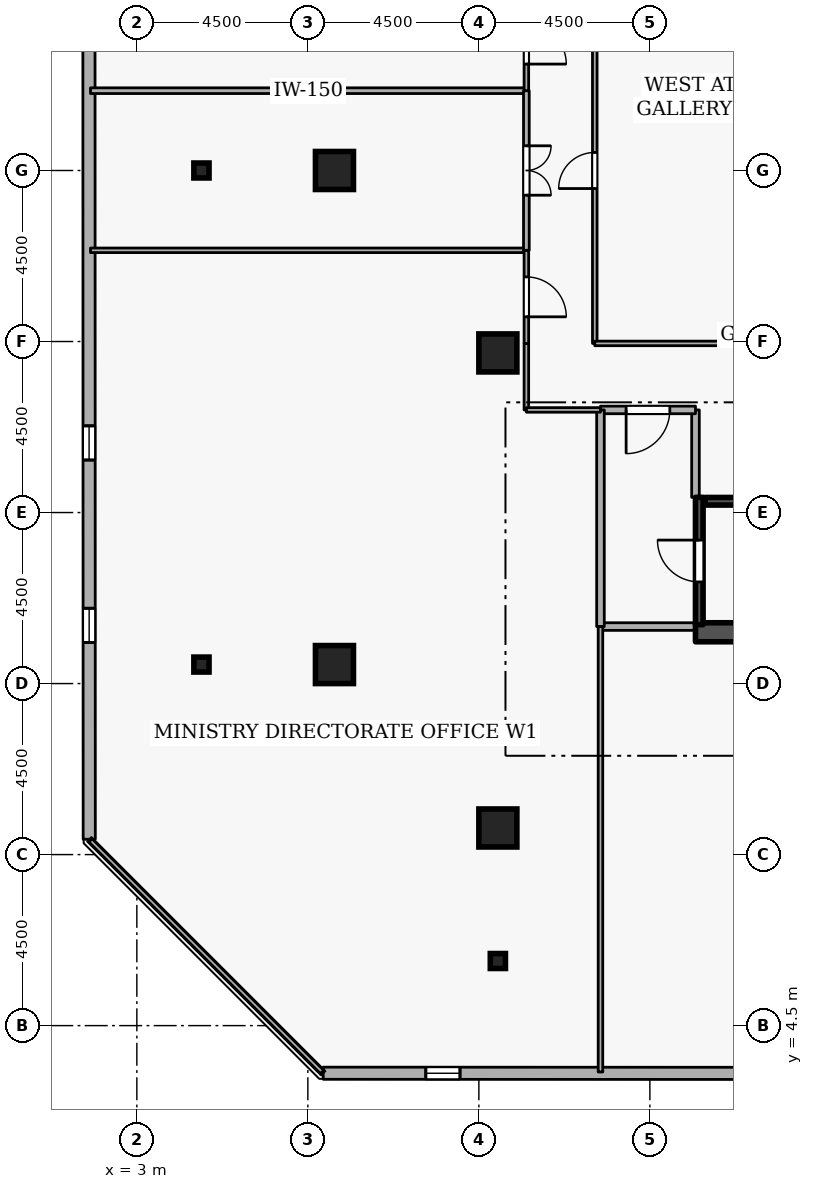
"""IFC4 building model, lengths in metres.
Left out: names, types, materials, properties, quantities, classifications, styles, units other than length and angle.
Written with IfcOpenShell. Run it as: python <this file> out.ifc"""

import sys

from ifc_helpers import new_model, si_unit, direction, frame, frame_2d, origin, origin_2d, place, context, subcontext, project, spatial, rectangle, i_section, extrude, element, fill, save


model = new_model("IFC4")
c1 = context("Model", 3, precision=1e-05, world=origin(), true_north=direction((0.0, 1.0)))
c2 = subcontext(c1, "Body", "Model", "MODEL_VIEW")
j1 = project(units=[si_unit("LENGTHUNIT", "METRE"), si_unit("PLANEANGLEUNIT", "RADIAN")], contexts=[c1])
p1 = place(None, origin())
s1 = spatial("IfcSite", under=j1, at=p1, CompositionType="ELEMENT")
p2 = place(p1, origin())
s2 = spatial("IfcBuilding", under=s1, at=p2, CompositionType="ELEMENT")
p3 = place(p2, frame((0.0, 0.0, 229.5)))
s3 = spatial("IfcBuildingStorey", under=s2, at=p3, CompositionType="ELEMENT", Elevation=229.5)
p4 = place(p3, frame((17.7, 14.85, 0.0), z_axis=(0.0, 0.0, 1.0), x_axis=(1.0, 0.0, 0.0)))
e1 = element("IfcWall", 1, at=p4, inside=s3, PredefinedType="SHEAR", context=c2, shape_type="SweptSolid", body=[
    extrude(rectangle(XDim=15.6, YDim=0.5, at=frame_2d((7.8, 0.0))), origin(), (0.0, 0.0, 1.0), 3.6),
])
for number, where, z_axis, x_axis in (
    (2, (12.5, 9.7, 0.0), (0.0, 0.0, 1.0), (1.0, 0.0, 0.0)),
    (3, (8.2, 14.0, 0.0), (0.0, 0.0, 1.0), (1.0, 0.0, 0.0)),
    (4, (8.2, 27.0, 0.0), (0.0, 0.0, 1.0), (1.0, 0.0, 0.0)),
    (5, (12.5, 22.2, 0.0), (0.0, 0.0, 1.0), (1.0, 0.0, 0.0)),
):
    element("IfcColumn", number, at=place(p3, frame(where, z_axis=z_axis, x_axis=x_axis)), inside=s3, PredefinedType="COLUMN", context=c2, shape_type="SweptSolid", body=[
        extrude(rectangle(XDim=1.0, YDim=1.0, at=origin_2d()), origin(), (0.0, 0.0, 1.0), 3.6),
    ])
for number, where, z_axis, x_axis in (
    (6, (12.5, 6.2, 0.0), (0.0, 0.0, 1.0), (1.0, 0.0, 0.0)),
    (7, (4.7, 14.0, 0.0), (0.0, 0.0, 1.0), (1.0, 0.0, 0.0)),
    (8, (4.7, 27.0, 0.0), (0.0, 0.0, 1.0), (1.0, 0.0, 0.0)),
):
    element("IfcColumn", number, at=place(p3, frame(where, z_axis=z_axis, x_axis=x_axis)), inside=s3, PredefinedType="COLUMN", context=c2, shape_type="SweptSolid", body=[
        extrude(i_section(OverallWidth=0.399, OverallDepth=0.394, WebThickness=0.023, FlangeThickness=0.037, FilletRadius=0.015, at=origin_2d()), origin(), (0.0, 0.0, 1.0), 3.6),
    ])
p5 = place(p3, frame((7.904, 3.247, 0.0), z_axis=(0.0, 0.0, 1.0), x_axis=(0.999999933399, -0.000364968916, 0.0)))
e9 = element("IfcWall", 9, at=p5, inside=s3, PredefinedType="STANDARD", context=c2, shape_type="SweptSolid", body=[
    extrude(rectangle(XDim=32.778, YDim=0.32, at=frame_2d((16.389, 0.0))), origin(), (0.0, 0.0, 1.0), 2.7),
])
p6 = place(p5, frame((2.7, 0.0, 0.72)))
e10 = element("IfcOpeningElement", 10, at=p6, cuts=e9, PredefinedType="OPENING", context=c2, shape_type="SweptSolid", body=[
    extrude(rectangle(XDim=0.9, YDim=1.75, at=frame_2d((0.45, 0.875))), frame((0.0, 0.17, 0.0), z_axis=(0.0, -1.0, 0.0), x_axis=(1.0, 0.0, 0.0)), (0.0, 0.0, 1.0), 0.34),
])
p7 = place(p5, frame((12.3, 0.0, 0.72)))
e11 = element("IfcOpeningElement", 11, at=p7, cuts=e9, PredefinedType="OPENING", context=c2, shape_type="SweptSolid", body=[
    extrude(rectangle(XDim=0.9, YDim=1.75, at=frame_2d((0.45, 0.875))), frame((0.0, 0.17, 0.0), z_axis=(0.0, -1.0, 0.0), x_axis=(1.0, 0.0, 0.0)), (0.0, 0.0, 1.0), 0.34),
])
p8 = place(p5, frame((17.1, 0.0, 0.72)))
e12 = element("IfcOpeningElement", 12, at=p8, cuts=e9, PredefinedType="OPENING", context=c2, shape_type="SweptSolid", body=[
    extrude(rectangle(XDim=0.9, YDim=1.75, at=frame_2d((0.45, 0.875))), frame((0.0, 0.17, 0.0), z_axis=(0.0, -1.0, 0.0), x_axis=(1.0, 0.0, 0.0)), (0.0, 0.0, 1.0), 0.34),
])
p9 = place(p5, frame((21.9, 0.0, 0.72)))
e13 = element("IfcOpeningElement", 13, at=p9, cuts=e9, PredefinedType="OPENING", context=c2, shape_type="SweptSolid", body=[
    extrude(rectangle(XDim=0.9, YDim=1.75, at=frame_2d((0.45, 0.875))), frame((0.0, 0.17, 0.0), z_axis=(0.0, -1.0, 0.0), x_axis=(1.0, 0.0, 0.0)), (0.0, 0.0, 1.0), 0.34),
])
p10 = place(p5, frame((26.7, 0.0, 0.72)))
e14 = element("IfcOpeningElement", 14, at=p10, cuts=e9, PredefinedType="OPENING", context=c2, shape_type="SweptSolid", body=[
    extrude(rectangle(XDim=0.9, YDim=1.75, at=frame_2d((0.45, 0.875))), frame((0.0, 0.17, 0.0), z_axis=(0.0, -1.0, 0.0), x_axis=(1.0, 0.0, 0.0)), (0.0, 0.0, 1.0), 0.34),
])
p11 = place(p3, frame((1.735, 42.181, 0.0), z_axis=(0.0, 0.0, 1.0), x_axis=(0.000364968916, -0.999999933399, 0.0)))
e15 = element("IfcWall", 15, at=p11, inside=s3, PredefinedType="STANDARD", context=c2, shape_type="SweptSolid", body=[
    extrude(rectangle(XDim=32.778, YDim=0.32, at=frame_2d((16.389, 0.0))), origin(), (0.0, 0.0, 1.0), 2.7),
])
p12 = place(p11, frame((2.7, 0.0, 0.72)))
e16 = element("IfcOpeningElement", 16, at=p12, cuts=e15, PredefinedType="OPENING", context=c2, shape_type="SweptSolid", body=[
    extrude(rectangle(XDim=0.9, YDim=1.75, at=frame_2d((0.45, 0.875))), frame((0.0, 0.17, 0.0), z_axis=(0.0, -1.0, 0.0), x_axis=(1.0, 0.0, 0.0)), (0.0, 0.0, 1.0), 0.34),
])
p13 = place(p11, frame((7.5, 0.0, 0.72)))
e17 = element("IfcOpeningElement", 17, at=p13, cuts=e15, PredefinedType="OPENING", context=c2, shape_type="SweptSolid", body=[
    extrude(rectangle(XDim=0.9, YDim=1.75, at=frame_2d((0.45, 0.875))), frame((0.0, 0.17, 0.0), z_axis=(0.0, -1.0, 0.0), x_axis=(1.0, 0.0, 0.0)), (0.0, 0.0, 1.0), 0.34),
])
p14 = place(p11, frame((21.9, 0.0, 0.72)))
e18 = element("IfcOpeningElement", 18, at=p14, cuts=e15, PredefinedType="OPENING", context=c2, shape_type="SweptSolid", body=[
    extrude(rectangle(XDim=0.9, YDim=1.75, at=frame_2d((0.45, 0.875))), frame((0.0, 0.17, 0.0), z_axis=(0.0, -1.0, 0.0), x_axis=(1.0, 0.0, 0.0)), (0.0, 0.0, 1.0), 0.34),
])
p15 = place(p11, frame((26.7, 0.0, 0.72)))
e19 = element("IfcOpeningElement", 19, at=p15, cuts=e15, PredefinedType="OPENING", context=c2, shape_type="SweptSolid", body=[
    extrude(rectangle(XDim=0.9, YDim=1.75, at=frame_2d((0.45, 0.875))), frame((0.0, 0.17, 0.0), z_axis=(0.0, -1.0, 0.0), x_axis=(1.0, 0.0, 0.0)), (0.0, 0.0, 1.0), 0.34),
])
p16 = place(p3, frame((17.8, 15.05, 0.0), z_axis=(0.0, 0.0, 1.0), x_axis=(0.0, 1.0, 0.0)))
e20 = element("IfcWall", 20, at=p16, inside=s3, PredefinedType="SHEAR", context=c2, shape_type="SweptSolid", body=[
    extrude(rectangle(XDim=3.35, YDim=0.2, at=frame_2d((1.675, 0.0))), origin(), (0.0, 0.0, 1.0), 3.6),
])
p17 = place(p16, frame((1.125, 0.0, 0.0)))
e21 = element("IfcOpeningElement", 21, at=p17, cuts=e20, PredefinedType="OPENING", context=c2, shape_type="SweptSolid", body=[
    extrude(rectangle(XDim=1.1, YDim=2.1, at=frame_2d((0.55, 1.05))), frame((0.0, 0.11, 0.0), z_axis=(0.0, -1.0, 0.0), x_axis=(1.0, 0.0, 0.0)), (0.0, 0.0, 1.0), 0.22),
])
p18 = place(p3, frame((25.05, 18.297, 0.0), z_axis=(0.0, 0.0, 1.0), x_axis=(-1.0, 0.0, 0.0)))
e22 = element("IfcWall", 22, at=p18, inside=s3, PredefinedType="SHEAR", context=c2, shape_type="SweptSolid", body=[
    extrude(rectangle(XDim=7.1, YDim=0.2, at=frame_2d((3.55, 0.0))), origin(), (0.0, 0.0, 1.0), 3.6),
])
p19 = place(p3, frame((15.2, 15.0, 0.0), z_axis=(0.0, 0.0, 1.0), x_axis=(1.0, 0.0, 0.0)))
e23 = element("IfcWall", 23, at=p19, inside=s3, PredefinedType="STANDARD", context=c2, shape_type="SweptSolid", body=[
    extrude(rectangle(XDim=2.5, YDim=0.2, at=frame_2d((1.25, 0.0))), origin(), (0.0, 0.0, 1.0), 3.3),
])
p20 = place(p3, frame((17.7, 18.4, 0.0), z_axis=(0.0, 0.0, 1.0), x_axis=(0.0, 1.0, 0.0)))
e24 = element("IfcWall", 24, at=p20, inside=s3, PredefinedType="STANDARD", context=c2, shape_type="SweptSolid", body=[
    extrude(rectangle(XDim=2.3, YDim=0.2, at=frame_2d((1.15, 0.0))), origin(), (0.0, 0.0, 1.0), 2.505),
])
p21 = place(p3, frame((17.7, 20.7, 0.0), z_axis=(0.0, 0.0, 1.0), x_axis=(-1.0, 0.0, 0.0)))
e25 = element("IfcWall", 25, at=p21, inside=s3, PredefinedType="STANDARD", context=c2, shape_type="SweptSolid", body=[
    extrude(rectangle(XDim=2.5, YDim=0.2, at=frame_2d((1.25, 0.0))), origin(), (0.0, 0.0, 1.0), 3.3),
])
p22 = place(p21, frame((0.675, 0.0, 0.0)))
e26 = element("IfcOpeningElement", 26, at=p22, cuts=e25, PredefinedType="OPENING", context=c2, shape_type="SweptSolid", body=[
    extrude(rectangle(XDim=1.15, YDim=2.1, at=frame_2d((0.575, 1.05))), frame((0.0, 0.11, 0.0), z_axis=(0.0, -1.0, 0.0), x_axis=(1.0, 0.0, 0.0)), (0.0, 0.0, 1.0), 0.22),
])
p23 = place(p3, frame((15.2, 20.7, 0.0), z_axis=(0.0, 0.0, 1.0), x_axis=(0.0, -1.0, 0.0)))
e27 = element("IfcWall", 27, at=p23, inside=s3, PredefinedType="STANDARD", context=c2, shape_type="SweptSolid", body=[
    extrude(rectangle(XDim=5.7, YDim=0.2, at=frame_2d((2.85, 0.0))), origin(), (0.0, 0.0, 1.0), 3.3),
])
p24 = place(p3, frame((13.25, 22.45, 0.0), z_axis=(0.0, 0.0, 1.0), x_axis=(0.0, -1.0, 0.0)))
e28 = element("IfcWall", 28, at=p24, inside=s3, PredefinedType="PARTITIONING", context=c2, shape_type="SweptSolid", body=[
    extrude(rectangle(XDim=1.75, YDim=0.12, at=frame_2d((0.875, 0.0))), origin(), (0.0, 0.0, 1.0), 3.3),
])
p25 = place(p3, frame((13.25, 20.7, 0.0), z_axis=(0.0, 0.0, 1.0), x_axis=(1.0, 0.0, 0.0)))
e29 = element("IfcWall", 29, at=p25, inside=s3, PredefinedType="PARTITIONING", context=c2, shape_type="SweptSolid", body=[
    extrude(rectangle(XDim=1.95, YDim=0.12, at=frame_2d((0.975, 0.0))), origin(), (0.0, 0.0, 1.0), 3.3),
])
p26 = place(p3, frame((15.2, 15.0, 0.0), z_axis=(0.0, 0.0, 1.0), x_axis=(0.0, -1.0, 0.0)))
e30 = element("IfcWall", 30, at=p26, inside=s3, PredefinedType="PARTITIONING", context=c2, shape_type="SweptSolid", body=[
    extrude(rectangle(XDim=11.72, YDim=0.12, at=frame_2d((5.86, 0.0))), origin(), (0.0, 0.0, 1.0), 3.3),
])
p27 = place(p3, frame((7.875, 3.28, 0.0), z_axis=(0.0, 0.0, 1.0), x_axis=(-0.707106781187, 0.707106781187, 0.0)))
e31 = element("IfcWall", 31, at=p27, inside=s3, PredefinedType="PARTITIONING", context=c2, shape_type="SweptSolid", body=[
    extrude(rectangle(XDim=8.619, YDim=0.12, at=frame_2d((4.31, 0.0))), origin(), (0.0, 0.0, 1.0), 3.3),
])
p28 = place(p3, frame((1.78, 24.9, 0.0), z_axis=(0.0, 0.0, 1.0), x_axis=(1.0, 0.0, 0.0)))
e32 = element("IfcWall", 32, at=p28, inside=s3, PredefinedType="PARTITIONING", context=c2, shape_type="SweptSolid", body=[
    extrude(rectangle(XDim=11.47, YDim=0.12, at=frame_2d((5.735, 0.0))), origin(), (0.0, 0.0, 1.0), 3.3),
])
p29 = place(p3, frame((13.25, 24.9, 0.0), z_axis=(0.0, 0.0, 1.0), x_axis=(0.0, -1.0, 0.0)))
e33 = element("IfcWall", 33, at=p29, inside=s3, PredefinedType="PARTITIONING", context=c2, shape_type="SweptSolid", body=[
    extrude(rectangle(XDim=2.45, YDim=0.12, at=frame_2d((1.225, 0.0))), origin(), (0.0, 0.0, 1.0), 3.3),
])
p30 = place(p29, frame((0.7, 0.0, 0.0)))
e34 = element("IfcOpeningElement", 34, at=p30, cuts=e33, PredefinedType="OPENING", context=c2, shape_type="SweptSolid", body=[
    extrude(rectangle(XDim=1.05, YDim=2.1, at=frame_2d((0.525, 1.05))), frame((0.0, 0.07, 0.0), z_axis=(0.0, -1.0, 0.0), x_axis=(1.0, 0.0, 0.0)), (0.0, 0.0, 1.0), 0.14),
])
p31 = place(p3, frame((1.78, 29.1, 0.0), z_axis=(0.0, 0.0, 1.0), x_axis=(1.0, 0.0, 0.0)))
e35 = element("IfcWall", 35, at=p31, inside=s3, PredefinedType="PARTITIONING", context=c2, shape_type="SweptSolid", body=[
    extrude(rectangle(XDim=11.47, YDim=0.15, at=frame_2d((5.735, 0.0))), origin(), (0.0, 0.0, 1.0), 3.3),
])
p32 = place(p3, frame((13.25, 29.1, 0.0), z_axis=(0.0, 0.0, 1.0), x_axis=(0.0, -1.0, 0.0)))
e36 = element("IfcWall", 36, at=p32, inside=s3, PredefinedType="PARTITIONING", context=c2, shape_type="SweptSolid", body=[
    extrude(rectangle(XDim=4.2, YDim=0.15, at=frame_2d((2.1, 0.0))), origin(), (0.0, 0.0, 1.0), 3.3),
])
p33 = place(p32, frame((1.45, 0.0, 0.0)))
e37 = element("IfcOpeningElement", 37, at=p33, cuts=e36, PredefinedType="OPENING", context=c2, shape_type="SweptSolid", body=[
    extrude(rectangle(XDim=1.3, YDim=2.12, at=frame_2d((0.65, 1.06))), frame((0.0, 0.085, 0.0), z_axis=(0.0, -1.0, 0.0), x_axis=(1.0, 0.0, 0.0)), (0.0, 0.0, 1.0), 0.17),
])
p34 = place(p3, frame((13.25, 31.55, 0.0), z_axis=(0.0, 0.0, 1.0), x_axis=(0.0, -1.0, 0.0)))
e38 = element("IfcWall", 38, at=p34, inside=s3, PredefinedType="PARTITIONING", context=c2, shape_type="SweptSolid", body=[
    extrude(rectangle(XDim=2.45, YDim=0.12, at=frame_2d((1.225, 0.0))), origin(), (0.0, 0.0, 1.0), 3.3),
])
p35 = place(p34, frame((0.7, 0.0, 0.0)))
e39 = element("IfcOpeningElement", 39, at=p35, cuts=e38, PredefinedType="OPENING", context=c2, shape_type="SweptSolid", body=[
    extrude(rectangle(XDim=1.05, YDim=2.1, at=frame_2d((0.525, 1.05))), frame((0.0, 0.07, 0.0), z_axis=(0.0, -1.0, 0.0), x_axis=(1.0, 0.0, 0.0)), (0.0, 0.0, 1.0), 0.14),
])
p36 = place(p3, frame((15.05, 22.45, 0.0), z_axis=(0.0, 0.0, 1.0), x_axis=(0.0, 1.0, 0.0)))
e40 = element("IfcWall", 40, at=p36, inside=s3, PredefinedType="PARTITIONING", context=c2, shape_type="SweptSolid", body=[
    extrude(rectangle(XDim=9.1, YDim=0.12, at=frame_2d((4.55, 0.0))), origin(), (0.0, 0.0, 1.0), 3.3),
])
p37 = place(p36, frame((4.075, 0.0, 0.0)))
e41 = element("IfcOpeningElement", 41, at=p37, cuts=e40, PredefinedType="OPENING", context=c2, shape_type="SweptSolid", body=[
    extrude(rectangle(XDim=0.95, YDim=2.1, at=frame_2d((0.475, 1.05))), frame((0.0, 0.07, 0.0), z_axis=(0.0, -1.0, 0.0), x_axis=(1.0, 0.0, 0.0)), (0.0, 0.0, 1.0), 0.14),
])
p38 = place(p3, frame((20.9, 22.45, 0.0), z_axis=(0.0, 0.0, 1.0), x_axis=(-1.0, 0.0, 0.0)))
e42 = element("IfcWall", 42, at=p38, inside=s3, PredefinedType="PARTITIONING", context=c2, shape_type="SweptSolid", body=[
    extrude(rectangle(XDim=5.85, YDim=0.12, at=frame_2d((2.925, 0.0))), origin(), (0.0, 0.0, 1.0), 3.3),
])
p39 = place(p6, origin())
e43 = element("IfcWindow", 43, at=p39, inside=s3, PartitioningType="SINGLE_PANEL", PredefinedType="WINDOW", context=c2, shape_type="SweptSolid", body=[
    extrude(rectangle(XDim=0.9, YDim=1.75, at=frame_2d((0.45, 0.875))), frame((0.0, 0.03, 0.0), z_axis=(0.0, -1.0, 0.0), x_axis=(1.0, 0.0, 0.0)), (0.0, 0.0, 1.0), 0.06),
])
fill(e10, e43)
p40 = place(p14, origin())
e44 = element("IfcWindow", 44, at=p40, inside=s3, PartitioningType="SINGLE_PANEL", PredefinedType="WINDOW", context=c2, shape_type="SweptSolid", body=[
    extrude(rectangle(XDim=0.9, YDim=1.75, at=frame_2d((0.45, 0.875))), frame((0.0, 0.03, 0.0), z_axis=(0.0, -1.0, 0.0), x_axis=(1.0, 0.0, 0.0)), (0.0, 0.0, 1.0), 0.06),
])
fill(e18, e44)
p41 = place(p15, origin())
e45 = element("IfcWindow", 45, at=p41, inside=s3, PartitioningType="SINGLE_PANEL", PredefinedType="WINDOW", context=c2, shape_type="SweptSolid", body=[
    extrude(rectangle(XDim=0.9, YDim=1.75, at=frame_2d((0.45, 0.875))), frame((0.0, 0.03, 0.0), z_axis=(0.0, -1.0, 0.0), x_axis=(1.0, 0.0, 0.0)), (0.0, 0.0, 1.0), 0.06),
])
fill(e19, e45)
p42 = place(p17, origin())
e46 = element("IfcDoor", 46, at=p42, inside=s3, OperationType="SINGLE_SWING_RIGHT", PredefinedType="DOOR", context=c2, shape_type="SweptSolid", body=[
    extrude(rectangle(XDim=1.1, YDim=2.1, at=frame_2d((0.55, 1.05))), frame((0.0, 0.025, 0.0), z_axis=(0.0, -1.0, 0.0), x_axis=(1.0, 0.0, 0.0)), (0.0, 0.0, 1.0), 0.05),
])
fill(e21, e46)
p43 = place(p22, origin())
e47 = element("IfcDoor", 47, at=p43, inside=s3, OperationType="SINGLE_SWING_RIGHT", PredefinedType="DOOR", context=c2, shape_type="SweptSolid", body=[
    extrude(rectangle(XDim=1.15, YDim=2.1, at=frame_2d((0.575, 1.05))), frame((0.0, 0.025, 0.0), z_axis=(0.0, -1.0, 0.0), x_axis=(1.0, 0.0, 0.0)), (0.0, 0.0, 1.0), 0.05),
])
fill(e26, e47)
p44 = place(p30, origin())
e48 = element("IfcDoor", 48, at=p44, inside=s3, OperationType="SINGLE_SWING_RIGHT", PredefinedType="DOOR", context=c2, shape_type="SweptSolid", body=[
    extrude(rectangle(XDim=1.05, YDim=2.1, at=frame_2d((0.525, 1.05))), frame((0.0, 0.025, 0.0), z_axis=(0.0, -1.0, 0.0), x_axis=(1.0, 0.0, 0.0)), (0.0, 0.0, 1.0), 0.05),
])
fill(e34, e48)
p45 = place(p33, origin())
e49 = element("IfcDoor", 49, at=p45, inside=s3, OperationType="DOUBLE_DOOR_SINGLE_SWING", PredefinedType="DOOR", context=c2, shape_type="SweptSolid", body=[
    extrude(rectangle(XDim=1.3, YDim=2.12, at=frame_2d((0.65, 1.06))), frame((0.0, 0.025, 0.0), z_axis=(0.0, -1.0, 0.0), x_axis=(1.0, 0.0, 0.0)), (0.0, 0.0, 1.0), 0.05),
])
fill(e37, e49)
p46 = place(p35, origin())
e50 = element("IfcDoor", 50, at=p46, inside=s3, OperationType="SINGLE_SWING_RIGHT", PredefinedType="DOOR", context=c2, shape_type="SweptSolid", body=[
    extrude(rectangle(XDim=1.05, YDim=2.1, at=frame_2d((0.525, 1.05))), frame((0.0, 0.025, 0.0), z_axis=(0.0, -1.0, 0.0), x_axis=(1.0, 0.0, 0.0)), (0.0, 0.0, 1.0), 0.05),
])
fill(e39, e50)
p47 = place(p37, origin())
e51 = element("IfcDoor", 51, at=p47, inside=s3, OperationType="SINGLE_SWING_LEFT", PredefinedType="DOOR", context=c2, shape_type="SweptSolid", body=[
    extrude(rectangle(XDim=0.95, YDim=2.1, at=frame_2d((0.475, 1.05))), frame((0.0, 0.025, 0.0), z_axis=(0.0, -1.0, 0.0), x_axis=(1.0, 0.0, 0.0)), (0.0, 0.0, 1.0), 0.05),
])
fill(e41, e51)
save(model, sys.argv[1])
